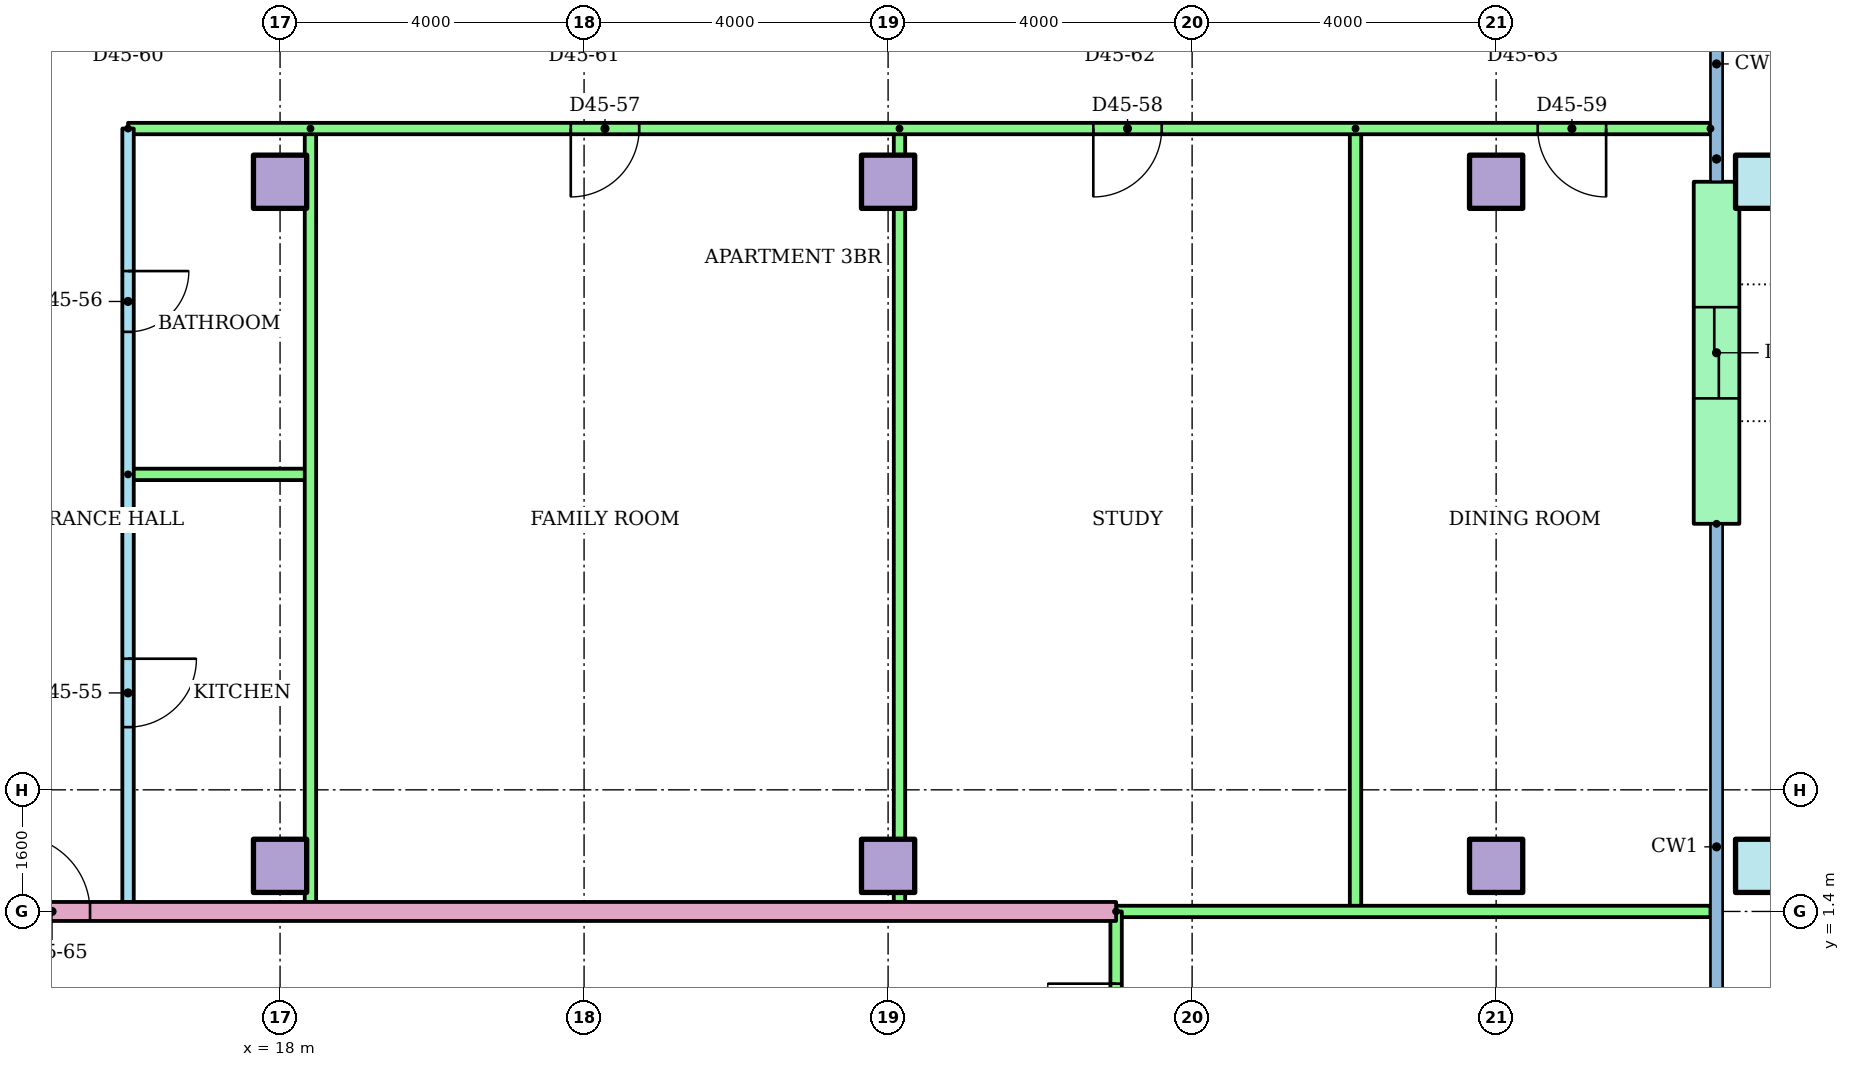
"""IFC4 building model, lengths in metres.
Left out: names, types, materials, properties, quantities, classifications, styles, units other than length and angle.
Written with IfcOpenShell. Run it as: python <this file> out.ifc"""

import sys

from ifc_helpers import new_model, si_unit, direction, frame, frame_2d, origin, origin_2d, place, context, subcontext, project, spatial, rectangle, hollow_rectangle, extrude, element, fill, save


model = new_model("IFC4")
c1 = context("Model", 3, precision=1e-05, world=origin(), true_north=direction((0.0, 1.0)))
c2 = subcontext(c1, "Body", "Model", "MODEL_VIEW")
j1 = project(units=[si_unit("LENGTHUNIT", "METRE"), si_unit("PLANEANGLEUNIT", "RADIAN")], contexts=[c1])
p1 = place(None, origin())
s1 = spatial("IfcSite", under=j1, at=p1, CompositionType="ELEMENT")
p2 = place(p1, origin())
s2 = spatial("IfcBuilding", under=s1, at=p2, CompositionType="ELEMENT")
p3 = place(p2, frame((0.0, 0.0, 174.9)))
s3 = spatial("IfcBuildingStorey", under=s2, at=p3, CompositionType="ELEMENT", Elevation=174.9)
for number, where in (
    (1, (18.0, 2.0, 0.0)),
    (2, (26.0, 2.0, 0.0)),
    (3, (34.0, 2.0, 0.0)),
):
    element("IfcColumn", number, at=place(p3, frame(where)), inside=s3, PredefinedType="COLUMN", context=c2, shape_type="SweptSolid", body=[
        extrude(rectangle(XDim=0.7, YDim=0.7, at=origin_2d()), origin(), (0.0, 0.0, 1.0), 3.2),
    ])
p4 = place(p3, frame((37.5, 2.0, 0.0)))
e4 = element("IfcColumn", 4, at=p4, inside=s3, PredefinedType="COLUMN", context=c2, shape_type="SweptSolid", body=[
    extrude(hollow_rectangle(XDim=0.7, YDim=0.7, WallThickness=0.036, at=origin_2d()), origin(), (0.0, 0.0, 1.0), 3.2),
])
for number, where in (
    (5, (18.0, 11.0, 0.0)),
    (6, (26.0, 11.0, 0.0)),
    (7, (34.0, 11.0, 0.0)),
):
    element("IfcColumn", number, at=place(p3, frame(where)), inside=s3, PredefinedType="COLUMN", context=c2, shape_type="SweptSolid", body=[
        extrude(rectangle(XDim=0.7, YDim=0.7, at=origin_2d()), origin(), (0.0, 0.0, 1.0), 3.2),
    ])
p5 = place(p3, frame((37.5, 11.0, 0.0)))
e8 = element("IfcColumn", 8, at=p5, inside=s3, PredefinedType="COLUMN", context=c2, shape_type="SweptSolid", body=[
    extrude(hollow_rectangle(XDim=0.7, YDim=0.7, WallThickness=0.036, at=origin_2d()), origin(), (0.0, 0.0, 1.0), 3.2),
])
p6 = place(p3, frame((36.9, 6.5, 0.0), z_axis=(0.0, 0.0, 1.0), x_axis=(0.0, 1.0, 0.0)))
e9 = element("IfcWall", 9, at=p6, inside=s3, PredefinedType="STANDARD", context=c2, shape_type="SweptSolid", body=[
    extrude(rectangle(XDim=4.5, YDim=0.6, at=frame_2d((2.25, 0.0))), origin(), (0.0, 0.0, 1.0), 2.92),
])
p7 = place(p6, frame((1.65, 0.0, 0.0)))
e10 = element("IfcOpeningElement", 10, at=p7, cuts=e9, PredefinedType="OPENING", context=c2, shape_type="SweptSolid", body=[
    extrude(rectangle(XDim=1.2, YDim=2.1, at=frame_2d((0.6, 1.05))), frame((0.0, 0.31, 0.0), z_axis=(0.0, -1.0, 0.0), x_axis=(1.0, 0.0, 0.0)), (0.0, 0.0, 1.0), 0.62),
])
p8 = place(p3, frame((16.0, 11.7, 0.0), z_axis=(0.0, 0.0, 1.0), x_axis=(0.0, -1.0, 0.0)))
e11 = element("IfcWall", 11, at=p8, inside=s3, PredefinedType="PARTITIONING", context=c2, shape_type="SweptSolid", body=[
    extrude(rectangle(XDim=10.3, YDim=0.15, at=frame_2d((5.15, 0.0))), origin(), (0.0, 0.0, 1.0), 2.4),
])
p9 = place(p8, frame((6.975, 0.0, 0.0)))
e12 = element("IfcOpeningElement", 12, at=p9, cuts=e11, PredefinedType="OPENING", context=c2, shape_type="SweptSolid", body=[
    extrude(rectangle(XDim=0.9, YDim=2.1, at=frame_2d((0.45, 1.05))), frame((0.0, 0.085, 0.0), z_axis=(0.0, -1.0, 0.0), x_axis=(1.0, 0.0, 0.0)), (0.0, 0.0, 1.0), 0.17),
])
p10 = place(p8, frame((1.875, 0.0, 0.0)))
e13 = element("IfcOpeningElement", 13, at=p10, cuts=e11, PredefinedType="OPENING", context=c2, shape_type="SweptSolid", body=[
    extrude(rectangle(XDim=0.8, YDim=2.1, at=frame_2d((0.4, 1.05))), frame((0.0, 0.085, 0.0), z_axis=(0.0, -1.0, 0.0), x_axis=(1.0, 0.0, 0.0)), (0.0, 0.0, 1.0), 0.17),
])
p11 = place(p3, frame((16.0, 7.15, 0.0)))
e14 = element("IfcWall", 14, at=p11, inside=s3, PredefinedType="PARTITIONING", context=c2, shape_type="SweptSolid", body=[
    extrude(rectangle(XDim=2.4, YDim=0.15, at=frame_2d((1.2, 0.0))), origin(), (0.0, 0.0, 1.0), 2.4),
])
for number, where, z_axis, x_axis in (
    (15, (18.4, 11.7, 0.0), (0.0, 0.0, 1.0), (0.0, -1.0, 0.0)),
    (16, (26.15, 11.7, 0.0), (0.0, 0.0, 1.0), (0.0, -1.0, 0.0)),
    (17, (32.15, 11.7, 0.0), (0.0, 0.0, 1.0), (0.0, -1.0, 0.0)),
):
    element("IfcWall", number, at=place(p3, frame(where, z_axis=z_axis, x_axis=x_axis)), inside=s3, PredefinedType="PARTITIONING", context=c2, shape_type="SweptSolid", body=[
        extrude(rectangle(XDim=10.3, YDim=0.15, at=frame_2d((5.15, 0.0))), origin(), (0.0, 0.0, 1.0), 2.4),
    ])
p12 = place(p3, frame((36.82, 11.7, 0.0), z_axis=(0.0, 0.0, 1.0), x_axis=(-1.0, 0.0, 0.0)))
e18 = element("IfcWall", 18, at=p12, inside=s3, PredefinedType="PARTITIONING", context=c2, shape_type="SweptSolid", body=[
    extrude(rectangle(XDim=20.82, YDim=0.15, at=frame_2d((10.41, 0.0))), origin(), (0.0, 0.0, 1.0), 2.4),
])
p13 = place(p12, frame((14.095, 0.0, 0.0)))
e19 = element("IfcOpeningElement", 19, at=p13, cuts=e18, PredefinedType="OPENING", context=c2, shape_type="SweptSolid", body=[
    extrude(rectangle(XDim=0.9, YDim=2.1, at=frame_2d((0.45, 1.05))), frame((0.0, 0.085, 0.0), z_axis=(0.0, -1.0, 0.0), x_axis=(1.0, 0.0, 0.0)), (0.0, 0.0, 1.0), 0.17),
])
p14 = place(p12, frame((7.22, 0.0, 0.0)))
e20 = element("IfcOpeningElement", 20, at=p14, cuts=e18, PredefinedType="OPENING", context=c2, shape_type="SweptSolid", body=[
    extrude(rectangle(XDim=0.9, YDim=2.1, at=frame_2d((0.45, 1.05))), frame((0.0, 0.085, 0.0), z_axis=(0.0, -1.0, 0.0), x_axis=(1.0, 0.0, 0.0)), (0.0, 0.0, 1.0), 0.17),
])
p15 = place(p12, frame((1.373, 0.0, 0.0)))
e21 = element("IfcOpeningElement", 21, at=p15, cuts=e18, PredefinedType="OPENING", context=c2, shape_type="SweptSolid", body=[
    extrude(rectangle(XDim=0.9, YDim=2.1, at=frame_2d((0.45, 1.05))), frame((0.0, 0.085, 0.0), z_axis=(0.0, -1.0, 0.0), x_axis=(1.0, 0.0, 0.0)), (0.0, 0.0, 1.0), 0.17),
])
p16 = place(p3, frame((14.0, 1.4, 0.0)))
e22 = element("IfcWall", 22, at=p16, inside=s3, PredefinedType="PARTITIONING", context=c2, shape_type="SweptSolid", body=[
    extrude(rectangle(XDim=15.0, YDim=0.25, at=frame_2d((7.5, 0.0))), origin(), (0.0, 0.0, 1.0), 2.4),
])
p17 = place(p16, frame((0.5, 0.0, 0.0)))
e23 = element("IfcOpeningElement", 23, at=p17, cuts=e22, PredefinedType="OPENING", context=c2, shape_type="SweptSolid", body=[
    extrude(rectangle(XDim=1.0, YDim=2.1, at=frame_2d((0.5, 1.05))), frame((0.0, 0.135, 0.0), z_axis=(0.0, -1.0, 0.0), x_axis=(1.0, 0.0, 0.0)), (0.0, 0.0, 1.0), 0.27),
])
p18 = place(p3, frame((29.0, 1.4, 0.0)))
e24 = element("IfcWall", 24, at=p18, inside=s3, PredefinedType="PARTITIONING", context=c2, shape_type="SweptSolid", body=[
    extrude(rectangle(XDim=7.82, YDim=0.15, at=frame_2d((3.91, 0.0))), origin(), (0.0, 0.0, 1.0), 2.4),
])
p19 = place(p3, frame((29.0, -1.4, 0.0), z_axis=(0.0, 0.0, 1.0), x_axis=(0.0, 1.0, 0.0)))
e25 = element("IfcWall", 25, at=p19, inside=s3, PredefinedType="PARTITIONING", context=c2, shape_type="SweptSolid", body=[
    extrude(rectangle(XDim=2.8, YDim=0.15, at=frame_2d((1.4, 0.0))), origin(), (0.0, 0.0, 1.0), 2.4),
])
p20 = place(p19, frame((0.95, 0.0, 0.0)))
e26 = element("IfcOpeningElement", 26, at=p20, cuts=e25, PredefinedType="OPENING", context=c2, shape_type="SweptSolid", body=[
    extrude(rectangle(XDim=0.9, YDim=2.1, at=frame_2d((0.45, 1.05))), frame((0.0, 0.085, 0.0), z_axis=(0.0, -1.0, 0.0), x_axis=(1.0, 0.0, 0.0)), (0.0, 0.0, 1.0), 0.17),
])
p21 = place(p9, origin())
e27 = element("IfcDoor", 27, at=p21, inside=s3, OperationType="SINGLE_SWING_LEFT", PredefinedType="DOOR", context=c2, shape_type="SweptSolid", body=[
    extrude(rectangle(XDim=0.9, YDim=2.1, at=frame_2d((0.45, 1.05))), frame((0.0, 0.025, 0.0), z_axis=(0.0, -1.0, 0.0), x_axis=(1.0, 0.0, 0.0)), (0.0, 0.0, 1.0), 0.05),
])
fill(e12, e27)
p22 = place(p10, origin())
e28 = element("IfcDoor", 28, at=p22, inside=s3, OperationType="SINGLE_SWING_LEFT", PredefinedType="DOOR", context=c2, shape_type="SweptSolid", body=[
    extrude(rectangle(XDim=0.8, YDim=2.1, at=frame_2d((0.4, 1.05))), frame((0.0, 0.025, 0.0), z_axis=(0.0, -1.0, 0.0), x_axis=(1.0, 0.0, 0.0)), (0.0, 0.0, 1.0), 0.05),
])
fill(e13, e28)
p23 = place(p13, origin())
e29 = element("IfcDoor", 29, at=p23, inside=s3, OperationType="SINGLE_SWING_RIGHT", PredefinedType="DOOR", context=c2, shape_type="SweptSolid", body=[
    extrude(rectangle(XDim=0.9, YDim=2.1, at=frame_2d((0.45, 1.05))), frame((0.0, 0.025, 0.0), z_axis=(0.0, -1.0, 0.0), x_axis=(1.0, 0.0, 0.0)), (0.0, 0.0, 1.0), 0.05),
])
fill(e19, e29)
p24 = place(p14, origin())
e30 = element("IfcDoor", 30, at=p24, inside=s3, OperationType="SINGLE_SWING_RIGHT", PredefinedType="DOOR", context=c2, shape_type="SweptSolid", body=[
    extrude(rectangle(XDim=0.9, YDim=2.1, at=frame_2d((0.45, 1.05))), frame((0.0, 0.025, 0.0), z_axis=(0.0, -1.0, 0.0), x_axis=(1.0, 0.0, 0.0)), (0.0, 0.0, 1.0), 0.05),
])
fill(e20, e30)
p25 = place(p15, origin())
e31 = element("IfcDoor", 31, at=p25, inside=s3, OperationType="SINGLE_SWING_LEFT", PredefinedType="DOOR", context=c2, shape_type="SweptSolid", body=[
    extrude(rectangle(XDim=0.9, YDim=2.1, at=frame_2d((0.45, 1.05))), frame((0.0, 0.025, 0.0), z_axis=(0.0, -1.0, 0.0), x_axis=(1.0, 0.0, 0.0)), (0.0, 0.0, 1.0), 0.05),
])
fill(e21, e31)
p26 = place(p17, origin())
e32 = element("IfcDoor", 32, at=p26, inside=s3, OperationType="SINGLE_SWING_LEFT", PredefinedType="DOOR", context=c2, shape_type="SweptSolid", body=[
    extrude(rectangle(XDim=1.0, YDim=2.1, at=frame_2d((0.5, 1.05))), frame((0.0, 0.025, 0.0), z_axis=(0.0, -1.0, 0.0), x_axis=(1.0, 0.0, 0.0)), (0.0, 0.0, 1.0), 0.05),
])
fill(e23, e32)
p27 = place(p20, origin())
e33 = element("IfcDoor", 33, at=p27, inside=s3, OperationType="SINGLE_SWING_RIGHT", PredefinedType="DOOR", context=c2, shape_type="SweptSolid", body=[
    extrude(rectangle(XDim=0.9, YDim=2.1, at=frame_2d((0.45, 1.05))), frame((0.0, 0.025, 0.0), z_axis=(0.0, -1.0, 0.0), x_axis=(1.0, 0.0, 0.0)), (0.0, 0.0, 1.0), 0.05),
])
fill(e26, e33)
p28 = place(p7, origin())
e34 = element("IfcDoor", 34, at=p28, inside=s3, OperationType="SLIDING_TO_LEFT", PredefinedType="DOOR", context=c2, shape_type="SweptSolid", body=[
    extrude(rectangle(XDim=1.2, YDim=2.1, at=frame_2d((0.6, 1.05))), frame((0.0, 0.025, 0.0), z_axis=(0.0, -1.0, 0.0), x_axis=(1.0, 0.0, 0.0)), (0.0, 0.0, 1.0), 0.05),
])
fill(e10, e34)
save(model, sys.argv[1])
